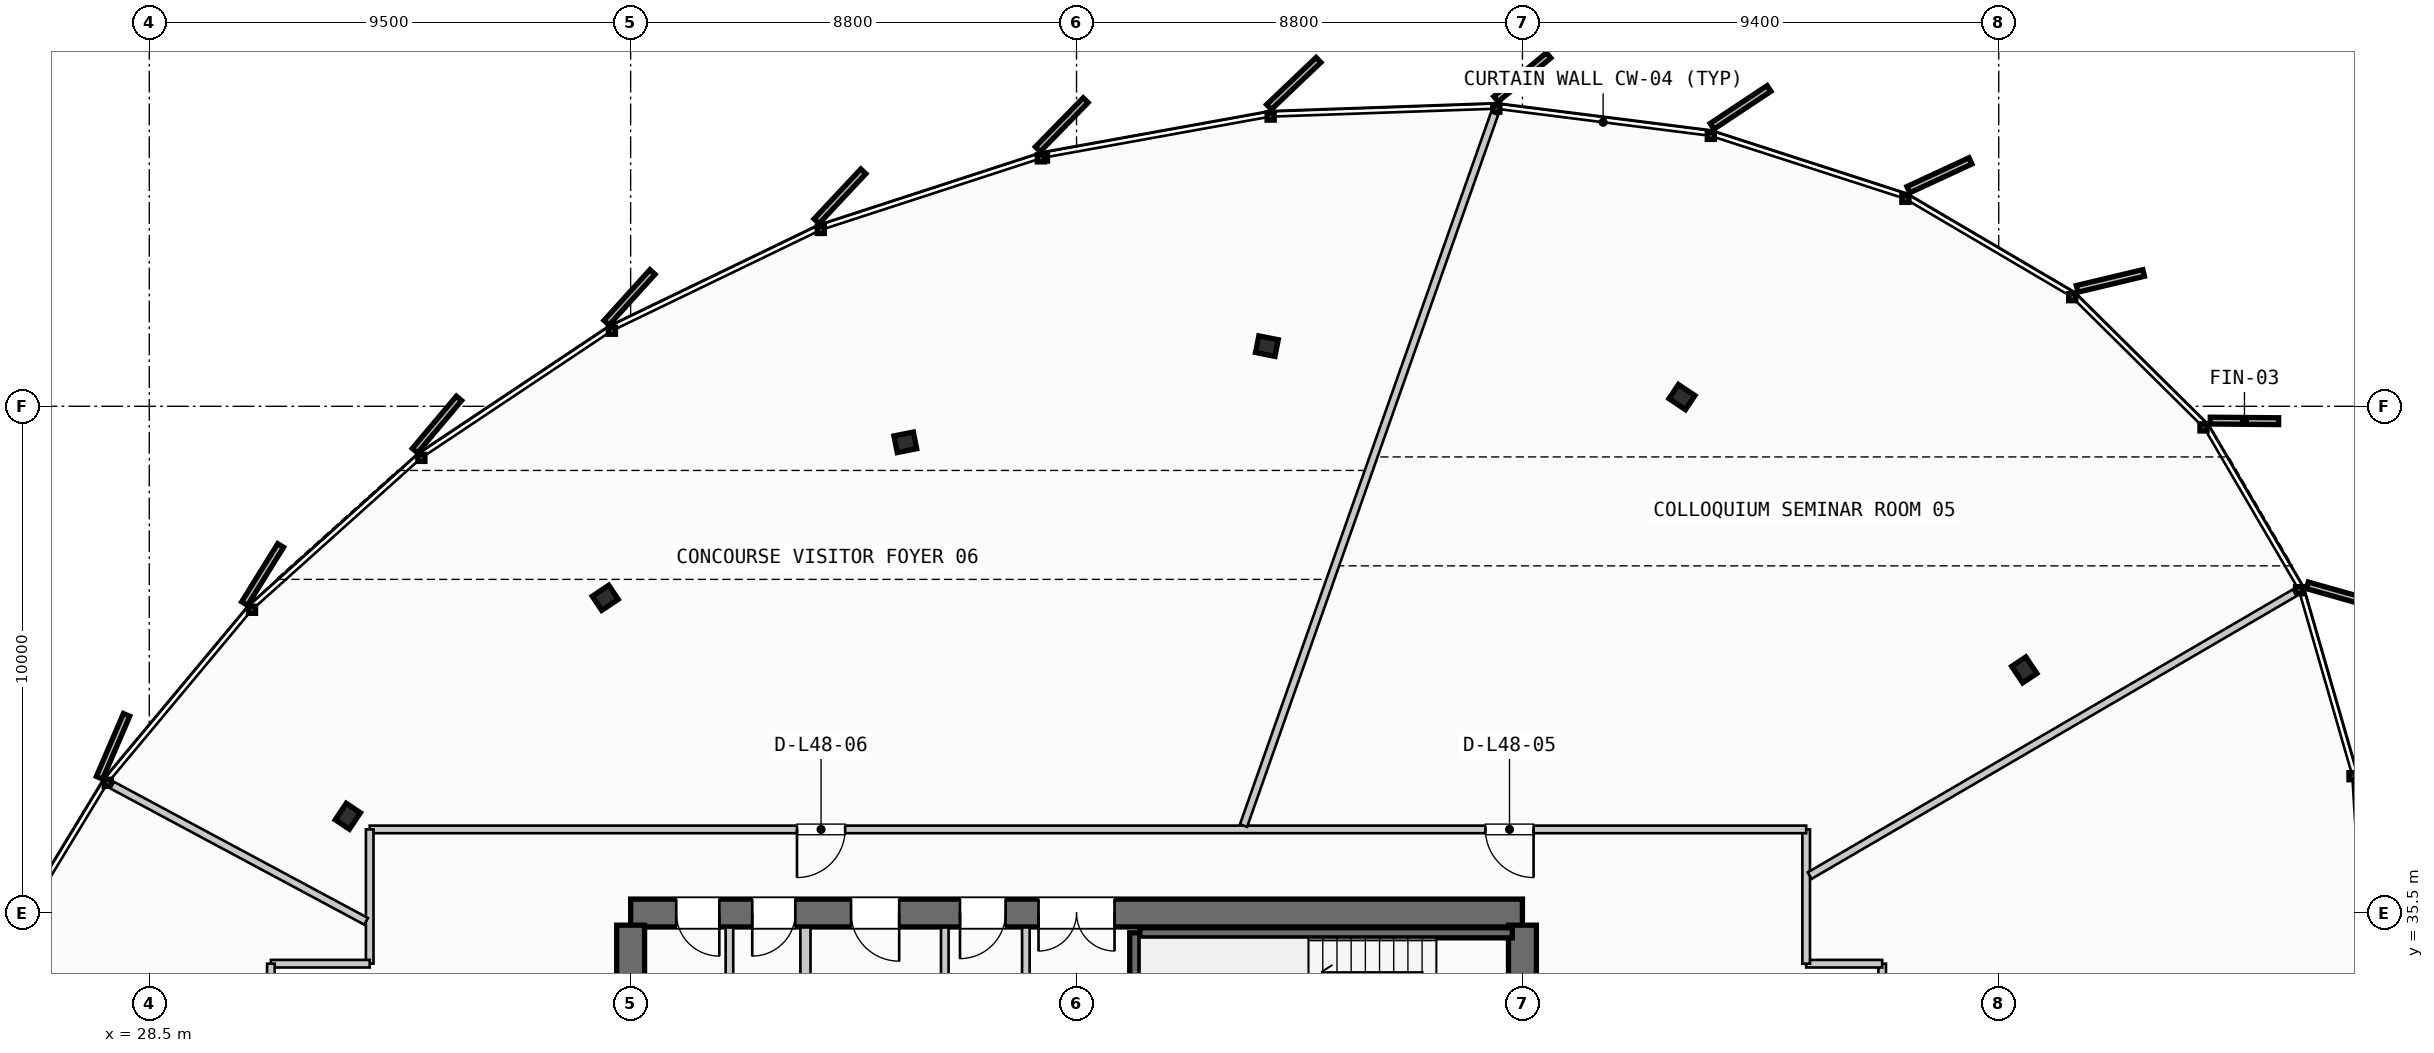
"""IFC4 building model, lengths in metres.
Left out: names, types, materials, properties, quantities, classifications, styles, units other than length and angle.
Written with IfcOpenShell. Run it as: python <this file> out.ifc"""

import sys

from ifc_helpers import new_model, si_unit, direction, frame, frame_2d, origin, origin_2d, place, context, subcontext, project, spatial, rectangle, i_section, extrude, source, transform, mapped, element, fill, save


model = new_model("IFC4")
c1 = context("Model", 3, precision=1e-05, world=origin(), true_north=direction((0.0, 1.0)))
c2 = subcontext(c1, "Body", "Model", "MODEL_VIEW")
j1 = project(units=[si_unit("LENGTHUNIT", "METRE"), si_unit("PLANEANGLEUNIT", "RADIAN")], contexts=[c1])
p1 = place(None, origin())
s1 = spatial("IfcSite", under=j1, at=p1, CompositionType="ELEMENT")
p2 = place(p1, origin())
s2 = spatial("IfcBuilding", under=s1, at=p2, CompositionType="ELEMENT")
p3 = place(p2, frame((0.0, 0.0, 186.9)))
s3 = spatial("IfcBuildingStorey", under=s2, at=p3, CompositionType="ELEMENT", Elevation=186.9)
p4 = place(p3, frame((55.6, 35.5, 0.0), z_axis=(0.0, 0.0, 1.0), x_axis=(-1.0, 0.0, 0.0)))
e1 = element("IfcWall", 1, at=p4, inside=s3, PredefinedType="SHEAR", context=c2, shape_type="SweptSolid", body=[
    extrude(rectangle(XDim=17.6, YDim=0.55, at=frame_2d((8.8, 0.0))), origin(), (0.0, 0.0, 1.0), 3.26),
])
p5 = place(p4, frame((8.05, 0.0, 0.0)))
e2 = element("IfcOpeningElement", 2, at=p5, cuts=e1, PredefinedType="OPENING", context=c2, shape_type="SweptSolid", body=[
    extrude(rectangle(XDim=1.5, YDim=2.2, at=frame_2d((0.75, 1.1))), frame((0.0, 0.285, 0.0), z_axis=(0.0, -1.0, 0.0), x_axis=(1.0, 0.0, 0.0)), (0.0, 0.0, 1.0), 0.57),
])
p6 = place(p4, frame((15.85, 0.0, 0.0)))
e3 = element("IfcOpeningElement", 3, at=p6, cuts=e1, PredefinedType="OPENING", context=c2, shape_type="SweptSolid", body=[
    extrude(rectangle(XDim=0.85, YDim=2.15, at=frame_2d((0.425, 1.075))), frame((0.0, 0.285, 0.0), z_axis=(0.0, -1.0, 0.0), x_axis=(1.0, 0.0, 0.0)), (0.0, 0.0, 1.0), 0.57),
])
p7 = place(p4, frame((14.35, 0.0, 0.0)))
e4 = element("IfcOpeningElement", 4, at=p7, cuts=e1, PredefinedType="OPENING", context=c2, shape_type="SweptSolid", body=[
    extrude(rectangle(XDim=0.85, YDim=2.15, at=frame_2d((0.425, 1.075))), frame((0.0, 0.285, 0.0), z_axis=(0.0, -1.0, 0.0), x_axis=(1.0, 0.0, 0.0)), (0.0, 0.0, 1.0), 0.57),
])
p8 = place(p4, frame((12.3, 0.0, 0.0)))
e5 = element("IfcOpeningElement", 5, at=p8, cuts=e1, PredefinedType="OPENING", context=c2, shape_type="SweptSolid", body=[
    extrude(rectangle(XDim=0.95, YDim=2.15, at=frame_2d((0.475, 1.075))), frame((0.0, 0.285, 0.0), z_axis=(0.0, -1.0, 0.0), x_axis=(1.0, 0.0, 0.0)), (0.0, 0.0, 1.0), 0.57),
])
p9 = place(p4, frame((10.2, 0.0, 0.0)))
e6 = element("IfcOpeningElement", 6, at=p9, cuts=e1, PredefinedType="OPENING", context=c2, shape_type="SweptSolid", body=[
    extrude(rectangle(XDim=0.9, YDim=2.15, at=frame_2d((0.45, 1.075))), frame((0.0, 0.285, 0.0), z_axis=(0.0, -1.0, 0.0), x_axis=(1.0, 0.0, 0.0)), (0.0, 0.0, 1.0), 0.57),
])
p10 = place(p3, frame((38.0, 35.26, 0.0), z_axis=(0.0, 0.0, 1.0), x_axis=(0.0, -1.0, 0.0)))
e7 = element("IfcWall", 7, at=p10, inside=s3, PredefinedType="SHEAR", context=c2, shape_type="SweptSolid", body=[
    extrude(rectangle(XDim=14.92, YDim=0.55, at=frame_2d((7.46, 0.0))), origin(), (0.0, 0.0, 1.0), 3.26),
])
p11 = place(p10, frame((5.21, 0.0, 0.0)))
e8 = element("IfcOpeningElement", 8, at=p11, cuts=e7, PredefinedType="OPENING", context=c2, shape_type="SweptSolid", body=[
    extrude(rectangle(XDim=1.1, YDim=2.2, at=frame_2d((0.55, 1.1))), frame((0.0, 0.285, 0.0), z_axis=(0.0, -1.0, 0.0), x_axis=(1.0, 0.0, 0.0)), (0.0, 0.0, 1.0), 0.57),
])
p12 = place(p3, frame((55.6, 20.34, 0.0), z_axis=(0.0, 0.0, 1.0), x_axis=(0.0, 1.0, 0.0)))
e9 = element("IfcWall", 9, at=p12, inside=s3, PredefinedType="SHEAR", context=c2, shape_type="SweptSolid", body=[
    extrude(rectangle(XDim=14.92, YDim=0.55, at=frame_2d((7.46, 0.0))), origin(), (0.0, 0.0, 1.0), 3.26),
])
p13 = place(p12, frame((12.71, 0.0, 0.0)))
e10 = element("IfcOpeningElement", 10, at=p13, cuts=e9, PredefinedType="OPENING", context=c2, shape_type="SweptSolid", body=[
    extrude(rectangle(XDim=1.05, YDim=2.15, at=frame_2d((0.525, 1.075))), frame((0.0, 0.285, 0.0), z_axis=(0.0, -1.0, 0.0), x_axis=(1.0, 0.0, 0.0)), (0.0, 0.0, 1.0), 0.57),
])
p14 = place(p12, frame((8.61, 0.0, 0.0)))
e11 = element("IfcOpeningElement", 11, at=p14, cuts=e9, PredefinedType="OPENING", context=c2, shape_type="SweptSolid", body=[
    extrude(rectangle(XDim=1.1, YDim=2.2, at=frame_2d((0.55, 1.1))), frame((0.0, 0.285, 0.0), z_axis=(0.0, -1.0, 0.0), x_axis=(1.0, 0.0, 0.0)), (0.0, 0.0, 1.0), 0.57),
])
m1 = source(origin(), c2, "Body", "SweptSolid", [
    extrude(i_section(OverallWidth=0.391, OverallDepth=0.335, WebThickness=0.023, FlangeThickness=0.034, FilletRadius=0.015, at=origin_2d()), origin(), (0.0, 0.0, 1.0), 3.26),
])
for number, where, z_axis, x_axis in (
    (12, (65.504, 40.298, 0.0), (0.0, 0.0, 1.0), (0.831, 0.556, 0.0)),
    (13, (58.748, 45.681, 0.0), (0.0, 0.0, 1.0), (0.556, 0.831, 0.0)),
    (14, (50.557, 46.688, 0.0), (0.0, 0.0, 1.0), (0.195, 0.981, 0.0)),
    (15, (43.421, 44.789, 0.0), (0.0, 0.0, 1.0), (-0.195, 0.981, 0.0)),
    (16, (37.499, 41.72, 0.0), (0.0, 0.0, 1.0), (-0.556, 0.831, 0.0)),
    (17, (32.418, 37.409, 0.0), (0.0, 0.0, 1.0), (-0.831, 0.556, 0.0)),
):
    element("IfcColumn", number, at=place(p3, frame(where, z_axis=z_axis, x_axis=x_axis)), inside=s3, PredefinedType="COLUMN", context=c2, shape_type="MappedRepresentation", body=[
        mapped(m1, transform((0.0, 0.0, 0.0), scale=1.0)),
    ])
p15 = place(p3, frame((47.95, 32.05, 0.0), z_axis=(0.0, 0.0, 1.0), x_axis=(0.0, 1.0, 0.0)))
e18 = element("IfcWall", 18, at=p15, inside=s3, PredefinedType="SHEAR", context=c2, shape_type="SweptSolid", body=[
    extrude(rectangle(XDim=3.06, YDim=0.2, at=frame_2d((1.53, 0.0))), origin(), (0.0, 0.0, 1.0), 3.26),
])
p16 = place(p3, frame((48.05, 35.11, 0.0), z_axis=(0.0, 0.0, 1.0), x_axis=(1.0, 0.0, 0.0)))
e19 = element("IfcWall", 19, at=p16, inside=s3, PredefinedType="SHEAR", context=c2, shape_type="SweptSolid", body=[
    extrude(rectangle(XDim=7.35, YDim=0.2, at=frame_2d((3.675, 0.0))), origin(), (0.0, 0.0, 1.0), 3.26),
])
p17 = place(p3, frame((41.45, 31.85, 0.0), z_axis=(0.0, 0.0, 1.0), x_axis=(0.0, 1.0, 0.0)))
e20 = element("IfcWall", 20, at=p17, inside=s3, PredefinedType="PARTITIONING", context=c2, shape_type="SweptSolid", body=[
    extrude(rectangle(XDim=3.365, YDim=0.2, at=frame_2d((1.683, 0.0))), origin(), (0.0, 0.0, 1.0), 2.735),
])
for number, where, z_axis, x_axis in (
    (21, (45.8, 31.85, 0.0), (0.0, 0.0, 1.0), (0.0, 1.0, 0.0)),
    (22, (39.95, 31.85, 0.0), (0.0, 0.0, 1.0), (0.0, 1.0, 0.0)),
):
    element("IfcWall", number, at=place(p3, frame(where, z_axis=z_axis, x_axis=x_axis)), inside=s3, PredefinedType="PARTITIONING", context=c2, shape_type="SweptSolid", body=[
        extrude(rectangle(XDim=3.365, YDim=0.15, at=frame_2d((1.683, 0.0))), origin(), (0.0, 0.0, 1.0), 2.735),
    ])
p18 = place(p3, frame((44.2, 31.85, 0.0), z_axis=(0.0, 0.0, 1.0), x_axis=(0.0, 1.0, 0.0)))
e23 = element("IfcWall", 23, at=p18, inside=s3, PredefinedType="PLUMBINGWALL", context=c2, shape_type="SweptSolid", body=[
    extrude(rectangle(XDim=3.365, YDim=0.15, at=frame_2d((1.683, 0.0))), origin(), (0.0, 0.0, 1.0), 2.735),
])
p19 = place(p3, frame((62.7, 32.8, 0.0), z_axis=(0.0, 0.0, 1.0), x_axis=(0.0, 1.0, 0.0)))
e24 = element("IfcWall", 24, at=p19, inside=s3, PredefinedType="PARTITIONING", context=c2, shape_type="SweptSolid", body=[
    extrude(rectangle(XDim=1.7, YDim=0.15, at=frame_2d((0.85, 0.0))), origin(), (0.0, 0.0, 1.0), 2.735),
])
p20 = place(p3, frame((62.7, 34.5, 0.0), z_axis=(0.0, 0.0, 1.0), x_axis=(-1.0, 0.0, 0.0)))
e25 = element("IfcWall", 25, at=p20, inside=s3, PredefinedType="PARTITIONING", context=c2, shape_type="SweptSolid", body=[
    extrude(rectangle(XDim=1.5, YDim=0.15, at=frame_2d((0.75, 0.0))), origin(), (0.0, 0.0, 1.0), 2.735),
])
p21 = place(p3, frame((61.2, 34.5, 0.0), z_axis=(0.0, 0.0, 1.0), x_axis=(0.0, 1.0, 0.0)))
e26 = element("IfcWall", 26, at=p21, inside=s3, PredefinedType="PARTITIONING", context=c2, shape_type="SweptSolid", body=[
    extrude(rectangle(XDim=2.65, YDim=0.15, at=frame_2d((1.325, 0.0))), origin(), (0.0, 0.0, 1.0), 2.735),
])
p22 = place(p3, frame((61.2, 37.15, 0.0), z_axis=(0.0, 0.0, 1.0), x_axis=(-1.0, 0.0, 0.0)))
e27 = element("IfcWall", 27, at=p22, inside=s3, PredefinedType="PARTITIONING", context=c2, shape_type="SweptSolid", body=[
    extrude(rectangle(XDim=28.35, YDim=0.15, at=frame_2d((14.175, 0.0))), origin(), (0.0, 0.0, 1.0), 2.735),
])
p23 = place(p22, frame((5.38, 0.0, 0.0)))
e28 = element("IfcOpeningElement", 28, at=p23, cuts=e27, PredefinedType="OPENING", context=c2, shape_type="SweptSolid", body=[
    extrude(rectangle(XDim=0.95, YDim=2.15, at=frame_2d((0.475, 1.075))), frame((0.0, 0.085, 0.0), z_axis=(0.0, -1.0, 0.0), x_axis=(1.0, 0.0, 0.0)), (0.0, 0.0, 1.0), 0.17),
])
p24 = place(p22, frame((18.967, 0.0, 0.0)))
e29 = element("IfcOpeningElement", 29, at=p24, cuts=e27, PredefinedType="OPENING", context=c2, shape_type="SweptSolid", body=[
    extrude(rectangle(XDim=0.95, YDim=2.15, at=frame_2d((0.475, 1.075))), frame((0.0, 0.085, 0.0), z_axis=(0.0, -1.0, 0.0), x_axis=(1.0, 0.0, 0.0)), (0.0, 0.0, 1.0), 0.17),
])
p25 = place(p3, frame((32.85, 37.15, 0.0), z_axis=(0.0, 0.0, 1.0), x_axis=(0.0, -1.0, 0.0)))
e30 = element("IfcWall", 30, at=p25, inside=s3, PredefinedType="PARTITIONING", context=c2, shape_type="SweptSolid", body=[
    extrude(rectangle(XDim=2.65, YDim=0.15, at=frame_2d((1.325, 0.0))), origin(), (0.0, 0.0, 1.0), 2.735),
])
p26 = place(p3, frame((32.85, 34.5, 0.0), z_axis=(0.0, 0.0, 1.0), x_axis=(-1.0, 0.0, 0.0)))
e31 = element("IfcWall", 31, at=p26, inside=s3, PredefinedType="PARTITIONING", context=c2, shape_type="SweptSolid", body=[
    extrude(rectangle(XDim=1.95, YDim=0.15, at=frame_2d((0.975, 0.0))), origin(), (0.0, 0.0, 1.0), 2.735),
])
p27 = place(p3, frame((30.9, 34.5, 0.0), z_axis=(0.0, 0.0, 1.0), x_axis=(0.0, -1.0, 0.0)))
e32 = element("IfcWall", 32, at=p27, inside=s3, PredefinedType="PARTITIONING", context=c2, shape_type="SweptSolid", body=[
    extrude(rectangle(XDim=1.7, YDim=0.15, at=frame_2d((0.85, 0.0))), origin(), (0.0, 0.0, 1.0), 2.735),
])
p28 = place(p3, frame((61.269, 36.238, 0.0), z_axis=(0.0, 0.0, 1.0), x_axis=(0.863843622528, 0.503760057783, 0.0)))
e33 = element("IfcWall", 33, at=p28, inside=s3, PredefinedType="PARTITIONING", context=c2, shape_type="SweptSolid", body=[
    extrude(rectangle(XDim=11.081, YDim=0.15, at=frame_2d((5.541, 0.0))), origin(), (0.0, 0.0, 1.0), 2.735),
])
p29 = place(p3, frame((50.096, 37.225, 0.0), z_axis=(0.0, 0.0, 1.0), x_axis=(0.332557863643, 0.943082852844, 0.0)))
e34 = element("IfcWall", 34, at=p29, inside=s3, PredefinedType="PARTITIONING", context=c2, shape_type="SweptSolid", body=[
    extrude(rectangle(XDim=14.901, YDim=0.15, at=frame_2d((7.451, 0.0))), origin(), (0.0, 0.0, 1.0), 2.735),
])
p30 = place(p3, frame((32.78, 35.336, 0.0), z_axis=(0.0, 0.0, 1.0), x_axis=(-0.881284580635, 0.47258595825, 0.0)))
e35 = element("IfcWall", 35, at=p30, inside=s3, PredefinedType="PARTITIONING", context=c2, shape_type="SweptSolid", body=[
    extrude(rectangle(XDim=5.686, YDim=0.15, at=frame_2d((2.843, 0.0))), origin(), (0.0, 0.0, 1.0), 2.735),
])
m2 = source(origin(), c2, "Body", "SweptSolid", [
    extrude(rectangle(XDim=1.5, YDim=2.2, at=frame_2d((0.75, 1.1))), frame((0.0, 0.025, 0.0), z_axis=(0.0, -1.0, 0.0), x_axis=(1.0, 0.0, 0.0)), (0.0, 0.0, 1.0), 0.05),
])
p31 = place(p5, origin())
e36 = element("IfcDoor", 36, at=p31, inside=s3, OperationType="DOUBLE_DOOR_SINGLE_SWING", PredefinedType="DOOR", context=c2, shape_type="MappedRepresentation", body=[
    mapped(m2, transform((0.0, 0.0, 0.0), scale=1.0)),
])
fill(e2, e36)
m3 = source(origin(), c2, "Body", "SweptSolid", [
    extrude(rectangle(XDim=0.85, YDim=2.15, at=frame_2d((0.425, 1.075))), frame((0.0, 0.025, 0.0), z_axis=(0.0, -1.0, 0.0), x_axis=(1.0, 0.0, 0.0)), (0.0, 0.0, 1.0), 0.05),
])
p32 = place(p6, origin())
e37 = element("IfcDoor", 37, at=p32, inside=s3, OperationType="SINGLE_SWING_LEFT", PredefinedType="DOOR", context=c2, shape_type="MappedRepresentation", body=[
    mapped(m3, transform((0.0, 0.0, 0.0), scale=1.0)),
])
fill(e3, e37)
p33 = place(p7, origin())
e38 = element("IfcDoor", 38, at=p33, inside=s3, OperationType="SINGLE_SWING_RIGHT", PredefinedType="DOOR", context=c2, shape_type="MappedRepresentation", body=[
    mapped(m3, transform((0.0, 0.0, 0.0), scale=1.0)),
])
fill(e4, e38)
m4 = source(origin(), c2, "Body", "SweptSolid", [
    extrude(rectangle(XDim=0.95, YDim=2.15, at=frame_2d((0.475, 1.075))), frame((0.0, 0.025, 0.0), z_axis=(0.0, -1.0, 0.0), x_axis=(1.0, 0.0, 0.0)), (0.0, 0.0, 1.0), 0.05),
])
p34 = place(p8, origin())
e39 = element("IfcDoor", 39, at=p34, inside=s3, OperationType="SINGLE_SWING_LEFT", PredefinedType="DOOR", context=c2, shape_type="MappedRepresentation", body=[
    mapped(m4, transform((0.0, 0.0, 0.0), scale=1.0)),
])
fill(e5, e39)
m5 = source(origin(), c2, "Body", "SweptSolid", [
    extrude(rectangle(XDim=0.9, YDim=2.15, at=frame_2d((0.45, 1.075))), frame((0.0, 0.025, 0.0), z_axis=(0.0, -1.0, 0.0), x_axis=(1.0, 0.0, 0.0)), (0.0, 0.0, 1.0), 0.05),
])
p35 = place(p9, origin())
e40 = element("IfcDoor", 40, at=p35, inside=s3, OperationType="SINGLE_SWING_RIGHT", PredefinedType="DOOR", context=c2, shape_type="MappedRepresentation", body=[
    mapped(m5, transform((0.0, 0.0, 0.0), scale=1.0)),
])
fill(e6, e40)
p36 = place(p23, origin())
e41 = element("IfcDoor", 41, at=p36, inside=s3, OperationType="SINGLE_SWING_LEFT", PredefinedType="DOOR", context=c2, shape_type="MappedRepresentation", body=[
    mapped(m4, transform((0.0, 0.0, 0.0), scale=1.0)),
])
fill(e28, e41)
p37 = place(p24, origin())
e42 = element("IfcDoor", 42, at=p37, inside=s3, OperationType="SINGLE_SWING_RIGHT", PredefinedType="DOOR", context=c2, shape_type="MappedRepresentation", body=[
    mapped(m4, transform((0.0, 0.0, 0.0), scale=1.0)),
])
fill(e29, e42)
save(model, sys.argv[1])
